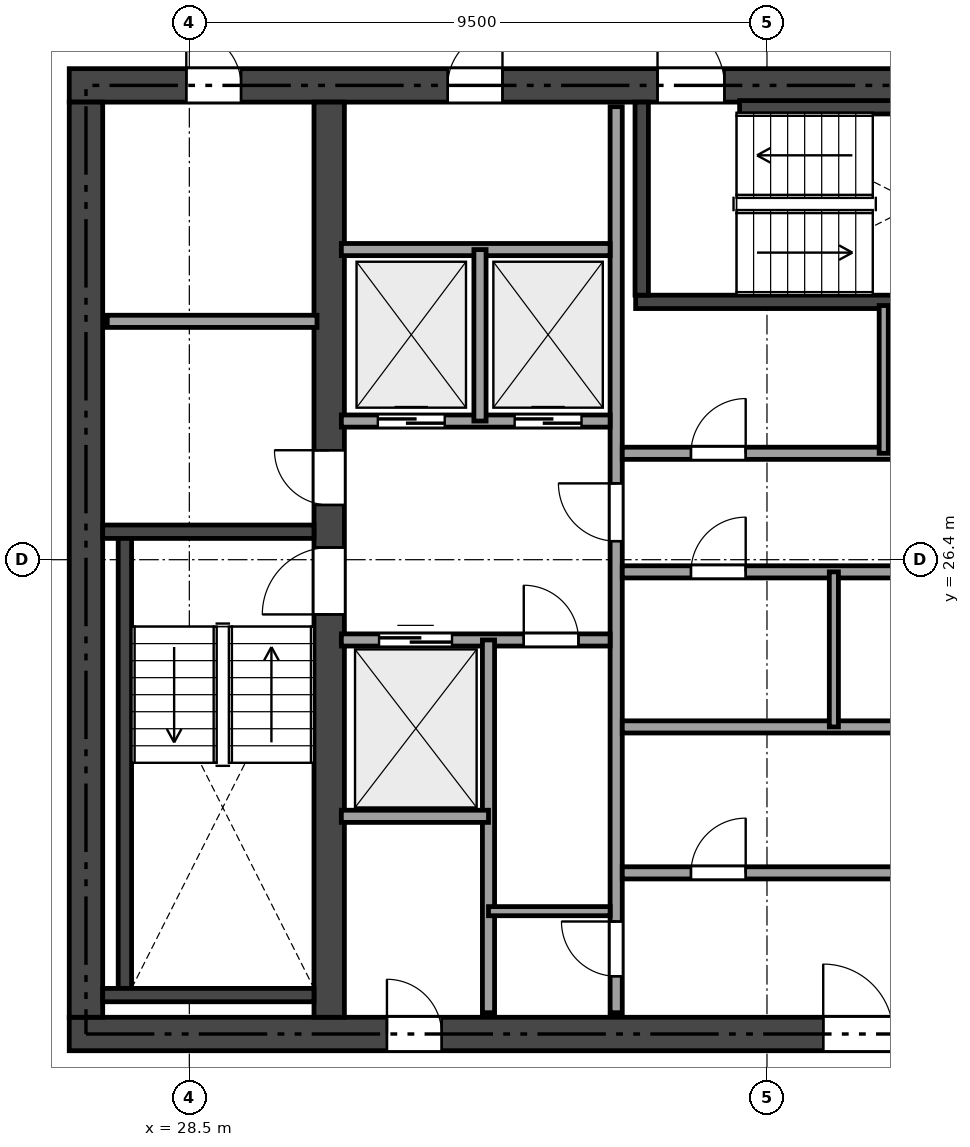
"""IFC4 building model, lengths in metres.
Left out: names, types, materials, properties, quantities, classifications, styles, units other than length and angle.
Written with IfcOpenShell. Run it as: python <this file> out.ifc"""

import sys

from ifc_helpers import new_model, si_unit, direction, frame, frame_2d, origin, place, context, subcontext, project, spatial, rectangle, extrude, element, fill, save


model = new_model("IFC4")
c1 = context("Model", 3, precision=1e-05, world=origin(), true_north=direction((0.0, 1.0)))
c2 = subcontext(c1, "Body", "Model", "MODEL_VIEW")
j1 = project(units=[si_unit("LENGTHUNIT", "METRE"), si_unit("PLANEANGLEUNIT", "RADIAN")], contexts=[c1])
p1 = place(None, origin())
s1 = spatial("IfcSite", under=j1, at=p1, CompositionType="ELEMENT")
p2 = place(p1, origin())
s2 = spatial("IfcBuilding", under=s1, at=p2, CompositionType="ELEMENT")
p3 = place(p2, frame((0.0, 0.0, 286.7)))
s3 = spatial("IfcBuildingStorey", under=s2, at=p3, CompositionType="ELEMENT", Elevation=286.7)
p4 = place(p3, frame((26.525, 18.6, 0.0), z_axis=(0.0, 0.0, 1.0), x_axis=(1.0, 0.0, 0.0)))
e1 = element("IfcWall", 1, at=p4, inside=s3, PredefinedType="SHEAR", context=c2, shape_type="SweptSolid", body=[
    extrude(rectangle(XDim=21.35, YDim=0.55, at=frame_2d((10.675, 0.0))), origin(), (0.0, 0.0, 1.0), 2.78),
])
p5 = place(p4, frame((12.4, 0.0, 0.0)))
e2 = element("IfcOpeningElement", 2, at=p5, cuts=e1, PredefinedType="OPENING", context=c2, shape_type="SweptSolid", body=[
    extrude(rectangle(XDim=1.15, YDim=2.15, at=frame_2d((0.575, 1.075))), frame((0.0, 0.285, 0.0), z_axis=(0.0, -1.0, 0.0), x_axis=(1.0, 0.0, 0.0)), (0.0, 0.0, 1.0), 0.57),
])
p6 = place(p4, frame((5.225, 0.0, 0.0)))
e3 = element("IfcOpeningElement", 3, at=p6, cuts=e1, PredefinedType="OPENING", context=c2, shape_type="SweptSolid", body=[
    extrude(rectangle(XDim=0.9, YDim=2.1, at=frame_2d((0.45, 1.05))), frame((0.0, 0.285, 0.0), z_axis=(0.0, -1.0, 0.0), x_axis=(1.0, 0.0, 0.0)), (0.0, 0.0, 1.0), 0.57),
])
p7 = place(p3, frame((26.525, 34.2, 0.0), z_axis=(0.0, 0.0, 1.0), x_axis=(1.0, 0.0, 0.0)))
e4 = element("IfcWall", 4, at=p7, inside=s3, PredefinedType="SHEAR", context=c2, shape_type="SweptSolid", body=[
    extrude(rectangle(XDim=21.35, YDim=0.55, at=frame_2d((10.675, 0.0))), origin(), (0.0, 0.0, 1.0), 2.78),
])
p8 = place(p7, frame((9.675, 0.0, 0.0)))
e5 = element("IfcOpeningElement", 5, at=p8, cuts=e4, PredefinedType="OPENING", context=c2, shape_type="SweptSolid", body=[
    extrude(rectangle(XDim=1.1, YDim=2.15, at=frame_2d((0.55, 1.075))), frame((0.0, 0.285, 0.0), z_axis=(0.0, -1.0, 0.0), x_axis=(1.0, 0.0, 0.0)), (0.0, 0.0, 1.0), 0.57),
])
p9 = place(p7, frame((1.925, 0.0, 0.0)))
e6 = element("IfcOpeningElement", 6, at=p9, cuts=e4, PredefinedType="OPENING", context=c2, shape_type="SweptSolid", body=[
    extrude(rectangle(XDim=0.9, YDim=2.1, at=frame_2d((0.45, 1.05))), frame((0.0, 0.285, 0.0), z_axis=(0.0, -1.0, 0.0), x_axis=(1.0, 0.0, 0.0)), (0.0, 0.0, 1.0), 0.57),
])
p10 = place(p7, frame((6.225, 0.0, 0.0)))
e7 = element("IfcOpeningElement", 7, at=p10, cuts=e4, PredefinedType="OPENING", context=c2, shape_type="SweptSolid", body=[
    extrude(rectangle(XDim=0.9, YDim=2.1, at=frame_2d((0.45, 1.05))), frame((0.0, 0.285, 0.0), z_axis=(0.0, -1.0, 0.0), x_axis=(1.0, 0.0, 0.0)), (0.0, 0.0, 1.0), 0.57),
])
p11 = place(p3, frame((26.8, 18.875, 0.0), z_axis=(0.0, 0.0, 1.0), x_axis=(0.0, 1.0, 0.0)))
e8 = element("IfcWall", 8, at=p11, inside=s3, PredefinedType="SHEAR", context=c2, shape_type="SweptSolid", body=[
    extrude(rectangle(XDim=15.05, YDim=0.55, at=frame_2d((7.525, 0.0))), origin(), (0.0, 0.0, 1.0), 2.78),
])
p12 = place(p3, frame((30.8, 18.875, 0.0), z_axis=(0.0, 0.0, 1.0), x_axis=(0.0, 1.0, 0.0)))
e9 = element("IfcWall", 9, at=p12, inside=s3, PredefinedType="SHEAR", context=c2, shape_type="SweptSolid", body=[
    extrude(rectangle(XDim=15.05, YDim=0.5, at=frame_2d((7.525, 0.0))), origin(), (0.0, 0.0, 1.0), 2.78),
])
p13 = place(p12, frame((6.625, 0.0, 0.0)))
e10 = element("IfcOpeningElement", 10, at=p13, cuts=e9, PredefinedType="OPENING", context=c2, shape_type="SweptSolid", body=[
    extrude(rectangle(XDim=1.1, YDim=2.15, at=frame_2d((0.55, 1.075))), frame((0.0, 0.26, 0.0), z_axis=(0.0, -1.0, 0.0), x_axis=(1.0, 0.0, 0.0)), (0.0, 0.0, 1.0), 0.52),
])
p14 = place(p12, frame((8.425, 0.0, 0.0)))
e11 = element("IfcOpeningElement", 11, at=p14, cuts=e9, PredefinedType="OPENING", context=c2, shape_type="SweptSolid", body=[
    extrude(rectangle(XDim=0.9, YDim=2.1, at=frame_2d((0.45, 1.05))), frame((0.0, 0.26, 0.0), z_axis=(0.0, -1.0, 0.0), x_axis=(1.0, 0.0, 0.0)), (0.0, 0.0, 1.0), 0.52),
])
p15 = place(p3, frame((27.075, 26.86, 0.0), z_axis=(0.0, 0.0, 1.0), x_axis=(1.0, 0.0, 0.0)))
e12 = element("IfcWall", 12, at=p15, inside=s3, PredefinedType="SHEAR", context=c2, shape_type="SweptSolid", body=[
    extrude(rectangle(XDim=3.475, YDim=0.22, at=frame_2d((1.738, 0.0))), origin(), (0.0, 0.0, 1.0), 2.78),
])
p16 = place(p3, frame((27.44, 19.35, 0.0), z_axis=(0.0, 0.0, 1.0), x_axis=(0.0, 1.0, 0.0)))
e13 = element("IfcWall", 13, at=p16, inside=s3, PredefinedType="SHEAR", context=c2, shape_type="SweptSolid", body=[
    extrude(rectangle(XDim=7.4, YDim=0.22, at=frame_2d((3.7, 0.0))), origin(), (0.0, 0.0, 1.0), 2.78),
])
p17 = place(p3, frame((27.075, 19.24, 0.0), z_axis=(0.0, 0.0, 1.0), x_axis=(1.0, 0.0, 0.0)))
e14 = element("IfcWall", 14, at=p17, inside=s3, PredefinedType="SHEAR", context=c2, shape_type="SweptSolid", body=[
    extrude(rectangle(XDim=3.475, YDim=0.22, at=frame_2d((1.738, 0.0))), origin(), (0.0, 0.0, 1.0), 2.78),
])
p18 = place(p3, frame((35.84, 30.64, 0.0), z_axis=(0.0, 0.0, 1.0), x_axis=(1.0, 0.0, 0.0)))
e15 = element("IfcWall", 15, at=p18, inside=s3, PredefinedType="SHEAR", context=c2, shape_type="SweptSolid", body=[
    extrude(rectangle(XDim=7.61, YDim=0.22, at=frame_2d((3.805, 0.0))), origin(), (0.0, 0.0, 1.0), 2.78),
])
p19 = place(p3, frame((35.94, 30.75, 0.0), z_axis=(0.0, 0.0, 1.0), x_axis=(0.0, 1.0, 0.0)))
e16 = element("IfcWall", 16, at=p19, inside=s3, PredefinedType="SHEAR", context=c2, shape_type="SweptSolid", body=[
    extrude(rectangle(XDim=3.175, YDim=0.22, at=frame_2d((1.587, 0.0))), origin(), (0.0, 0.0, 1.0), 2.78),
])
p20 = place(p3, frame((37.55, 33.84, 0.0), z_axis=(0.0, 0.0, 1.0), x_axis=(1.0, 0.0, 0.0)))
e17 = element("IfcWall", 17, at=p20, inside=s3, PredefinedType="SHEAR", context=c2, shape_type="SweptSolid", body=[
    extrude(rectangle(XDim=5.9, YDim=0.22, at=frame_2d((2.95, 0.0))), origin(), (0.0, 0.0, 1.0), 2.78),
])
p21 = place(p3, frame((27.15, 30.32, 0.0), z_axis=(0.0, 0.0, 1.0), x_axis=(1.0, 0.0, 0.0)))
e18 = element("IfcWall", 18, at=p21, inside=s3, PredefinedType="SOLIDWALL", context=c2, shape_type="SweptSolid", body=[
    extrude(rectangle(XDim=3.45, YDim=0.2, at=frame_2d((1.725, 0.0))), origin(), (0.0, 0.0, 1.0), 2.78),
])
p22 = place(p3, frame((35.52, 18.95, 0.0), z_axis=(0.0, 0.0, 1.0), x_axis=(0.0, 1.0, 0.0)))
e19 = element("IfcWall", 19, at=p22, inside=s3, PredefinedType="SOLIDWALL", context=c2, shape_type="SweptSolid", body=[
    extrude(rectangle(XDim=14.9, YDim=0.2, at=frame_2d((7.45, 0.0))), origin(), (0.0, 0.0, 1.0), 2.301),
])
p23 = place(p22, frame((7.755, 0.0, 0.0)))
e20 = element("IfcOpeningElement", 20, at=p23, cuts=e19, PredefinedType="OPENING", context=c2, shape_type="SweptSolid", body=[
    extrude(rectangle(XDim=0.95, YDim=2.15, at=frame_2d((0.475, 1.075))), frame((0.0, 0.11, 0.0), z_axis=(0.0, -1.0, 0.0), x_axis=(1.0, 0.0, 0.0)), (0.0, 0.0, 1.0), 0.22),
])
p24 = place(p22, frame((0.6, 0.0, 0.0)))
e21 = element("IfcOpeningElement", 21, at=p24, cuts=e19, PredefinedType="OPENING", context=c2, shape_type="SweptSolid", body=[
    extrude(rectangle(XDim=0.9, YDim=2.1, at=frame_2d((0.45, 1.05))), frame((0.0, 0.11, 0.0), z_axis=(0.0, -1.0, 0.0), x_axis=(1.0, 0.0, 0.0)), (0.0, 0.0, 1.0), 0.22),
])
p25 = place(p3, frame((31.0, 28.68, 0.0), z_axis=(0.0, 0.0, 1.0), x_axis=(1.0, 0.0, 0.0)))
e22 = element("IfcWall", 22, at=p25, inside=s3, PredefinedType="SOLIDWALL", context=c2, shape_type="SweptSolid", body=[
    extrude(rectangle(XDim=4.42, YDim=0.2, at=frame_2d((2.21, 0.0))), origin(), (0.0, 0.0, 1.0), 2.78),
])
p26 = place(p25, frame((0.6, 0.0, 0.0)))
e23 = element("IfcOpeningElement", 23, at=p26, cuts=e22, PredefinedType="OPENING", context=c2, shape_type="SweptSolid", body=[
    extrude(rectangle(XDim=1.1, YDim=2.15, at=frame_2d((0.55, 1.075))), frame((0.0, 0.11, 0.0), z_axis=(0.0, -1.0, 0.0), x_axis=(1.0, 0.0, 0.0)), (0.0, 0.0, 1.0), 0.22),
])
p27 = place(p25, frame((2.85, 0.0, 0.0)))
e24 = element("IfcOpeningElement", 24, at=p27, cuts=e22, PredefinedType="OPENING", context=c2, shape_type="SweptSolid", body=[
    extrude(rectangle(XDim=1.1, YDim=2.15, at=frame_2d((0.55, 1.075))), frame((0.0, 0.11, 0.0), z_axis=(0.0, -1.0, 0.0), x_axis=(1.0, 0.0, 0.0)), (0.0, 0.0, 1.0), 0.22),
])
p28 = place(p3, frame((31.0, 31.5, 0.0), z_axis=(0.0, 0.0, 1.0), x_axis=(1.0, 0.0, 0.0)))
e25 = element("IfcWall", 25, at=p28, inside=s3, PredefinedType="SOLIDWALL", context=c2, shape_type="SweptSolid", body=[
    extrude(rectangle(XDim=4.42, YDim=0.2, at=frame_2d((2.21, 0.0))), origin(), (0.0, 0.0, 1.0), 2.78),
])
p29 = place(p3, frame((33.28, 28.68, 0.0), z_axis=(0.0, 0.0, 1.0), x_axis=(0.0, 1.0, 0.0)))
e26 = element("IfcWall", 26, at=p29, inside=s3, PredefinedType="SOLIDWALL", context=c2, shape_type="SweptSolid", body=[
    extrude(rectangle(XDim=2.82, YDim=0.2, at=frame_2d((1.41, 0.0))), origin(), (0.0, 0.0, 1.0), 2.78),
])
p30 = place(p3, frame((31.0, 25.08, 0.0), z_axis=(0.0, 0.0, 1.0), x_axis=(1.0, 0.0, 0.0)))
e27 = element("IfcWall", 27, at=p30, inside=s3, PredefinedType="SOLIDWALL", context=c2, shape_type="SweptSolid", body=[
    extrude(rectangle(XDim=4.42, YDim=0.2, at=frame_2d((2.21, 0.0))), origin(), (0.0, 0.0, 1.0), 2.78),
])
p31 = place(p30, frame((3.0, 0.0, 0.0)))
e28 = element("IfcOpeningElement", 28, at=p31, cuts=e27, PredefinedType="OPENING", context=c2, shape_type="SweptSolid", body=[
    extrude(rectangle(XDim=0.9, YDim=2.1, at=frame_2d((0.45, 1.05))), frame((0.0, 0.11, 0.0), z_axis=(0.0, -1.0, 0.0), x_axis=(1.0, 0.0, 0.0)), (0.0, 0.0, 1.0), 0.22),
])
p32 = place(p30, frame((0.62, 0.0, 0.0)))
e29 = element("IfcOpeningElement", 29, at=p32, cuts=e27, PredefinedType="OPENING", context=c2, shape_type="SweptSolid", body=[
    extrude(rectangle(XDim=1.2, YDim=2.15, at=frame_2d((0.6, 1.075))), frame((0.0, 0.11, 0.0), z_axis=(0.0, -1.0, 0.0), x_axis=(1.0, 0.0, 0.0)), (0.0, 0.0, 1.0), 0.22),
])
p33 = place(p3, frame((33.42, 18.95, 0.0), z_axis=(0.0, 0.0, 1.0), x_axis=(0.0, 1.0, 0.0)))
e30 = element("IfcWall", 30, at=p33, inside=s3, PredefinedType="SOLIDWALL", context=c2, shape_type="SweptSolid", body=[
    extrude(rectangle(XDim=6.13, YDim=0.2, at=frame_2d((3.065, 0.0))), origin(), (0.0, 0.0, 1.0), 2.301),
])
p34 = place(p3, frame((31.0, 22.18, 0.0), z_axis=(0.0, 0.0, 1.0), x_axis=(1.0, 0.0, 0.0)))
e31 = element("IfcWall", 31, at=p34, inside=s3, PredefinedType="SOLIDWALL", context=c2, shape_type="SweptSolid", body=[
    extrude(rectangle(XDim=2.42, YDim=0.2, at=frame_2d((1.21, 0.0))), origin(), (0.0, 0.0, 1.0), 2.78),
])
p35 = place(p3, frame((33.42, 20.62, 0.0), z_axis=(0.0, 0.0, 1.0), x_axis=(1.0, 0.0, 0.0)))
e32 = element("IfcWall", 32, at=p35, inside=s3, PredefinedType="PARTITIONING", context=c2, shape_type="SweptSolid", body=[
    extrude(rectangle(XDim=2.0, YDim=0.15, at=frame_2d((1.0, 0.0))), origin(), (0.0, 0.0, 1.0), 2.78),
])
p36 = place(p3, frame((35.62, 28.15, 0.0), z_axis=(0.0, 0.0, 1.0), x_axis=(1.0, 0.0, 0.0)))
e33 = element("IfcWall", 33, at=p36, inside=s3, PredefinedType="SOLIDWALL", context=c2, shape_type="SweptSolid", body=[
    extrude(rectangle(XDim=7.88, YDim=0.2, at=frame_2d((3.94, 0.0))), origin(), (0.0, 0.0, 1.0), 2.78),
])
p37 = place(p36, frame((1.13, 0.0, 0.0)))
e34 = element("IfcOpeningElement", 34, at=p37, cuts=e33, PredefinedType="OPENING", context=c2, shape_type="SweptSolid", body=[
    extrude(rectangle(XDim=0.9, YDim=2.1, at=frame_2d((0.45, 1.05))), frame((0.0, 0.11, 0.0), z_axis=(0.0, -1.0, 0.0), x_axis=(1.0, 0.0, 0.0)), (0.0, 0.0, 1.0), 0.22),
])
p38 = place(p36, frame((5.73, 0.0, 0.0)))
e35 = element("IfcOpeningElement", 35, at=p38, cuts=e33, PredefinedType="OPENING", context=c2, shape_type="SweptSolid", body=[
    extrude(rectangle(XDim=0.9, YDim=2.1, at=frame_2d((0.45, 1.05))), frame((0.0, 0.11, 0.0), z_axis=(0.0, -1.0, 0.0), x_axis=(1.0, 0.0, 0.0)), (0.0, 0.0, 1.0), 0.22),
])
p39 = place(p3, frame((35.62, 26.2, 0.0), z_axis=(0.0, 0.0, 1.0), x_axis=(1.0, 0.0, 0.0)))
e36 = element("IfcWall", 36, at=p39, inside=s3, PredefinedType="SOLIDWALL", context=c2, shape_type="SweptSolid", body=[
    extrude(rectangle(XDim=7.88, YDim=0.2, at=frame_2d((3.94, 0.0))), origin(), (0.0, 0.0, 1.0), 2.78),
])
p40 = place(p39, frame((1.13, 0.0, 0.0)))
e37 = element("IfcOpeningElement", 37, at=p40, cuts=e36, PredefinedType="OPENING", context=c2, shape_type="SweptSolid", body=[
    extrude(rectangle(XDim=0.9, YDim=2.1, at=frame_2d((0.45, 1.05))), frame((0.0, 0.11, 0.0), z_axis=(0.0, -1.0, 0.0), x_axis=(1.0, 0.0, 0.0)), (0.0, 0.0, 1.0), 0.22),
])
p41 = place(p39, frame((5.73, 0.0, 0.0)))
e38 = element("IfcOpeningElement", 38, at=p41, cuts=e36, PredefinedType="OPENING", context=c2, shape_type="SweptSolid", body=[
    extrude(rectangle(XDim=0.9, YDim=2.1, at=frame_2d((0.45, 1.05))), frame((0.0, 0.11, 0.0), z_axis=(0.0, -1.0, 0.0), x_axis=(1.0, 0.0, 0.0)), (0.0, 0.0, 1.0), 0.22),
])
p42 = place(p3, frame((35.62, 23.65, 0.0), z_axis=(0.0, 0.0, 1.0), x_axis=(1.0, 0.0, 0.0)))
e39 = element("IfcWall", 39, at=p42, inside=s3, PredefinedType="SOLIDWALL", context=c2, shape_type="SweptSolid", body=[
    extrude(rectangle(XDim=7.88, YDim=0.2, at=frame_2d((3.94, 0.0))), origin(), (0.0, 0.0, 1.0), 2.301),
])
p43 = place(p3, frame((35.62, 21.25, 0.0), z_axis=(0.0, 0.0, 1.0), x_axis=(1.0, 0.0, 0.0)))
e40 = element("IfcWall", 40, at=p43, inside=s3, PredefinedType="SOLIDWALL", context=c2, shape_type="SweptSolid", body=[
    extrude(rectangle(XDim=7.88, YDim=0.2, at=frame_2d((3.94, 0.0))), origin(), (0.0, 0.0, 1.0), 2.78),
])
p44 = place(p43, frame((1.13, 0.0, 0.0)))
e41 = element("IfcOpeningElement", 41, at=p44, cuts=e40, PredefinedType="OPENING", context=c2, shape_type="SweptSolid", body=[
    extrude(rectangle(XDim=0.9, YDim=2.1, at=frame_2d((0.45, 1.05))), frame((0.0, 0.11, 0.0), z_axis=(0.0, -1.0, 0.0), x_axis=(1.0, 0.0, 0.0)), (0.0, 0.0, 1.0), 0.22),
])
p45 = place(p43, frame((5.73, 0.0, 0.0)))
e42 = element("IfcOpeningElement", 42, at=p45, cuts=e40, PredefinedType="OPENING", context=c2, shape_type="SweptSolid", body=[
    extrude(rectangle(XDim=0.9, YDim=2.1, at=frame_2d((0.45, 1.05))), frame((0.0, 0.11, 0.0), z_axis=(0.0, -1.0, 0.0), x_axis=(1.0, 0.0, 0.0)), (0.0, 0.0, 1.0), 0.22),
])
p46 = place(p3, frame((39.92, 28.15, 0.0), z_axis=(0.0, 0.0, 1.0), x_axis=(0.0, 1.0, 0.0)))
e43 = element("IfcWall", 43, at=p46, inside=s3, PredefinedType="PARTITIONING", context=c2, shape_type="SweptSolid", body=[
    extrude(rectangle(XDim=2.43, YDim=0.15, at=frame_2d((1.215, 0.0))), origin(), (0.0, 0.0, 1.0), 2.78),
])
p47 = place(p3, frame((39.1, 23.65, 0.0), z_axis=(0.0, 0.0, 1.0), x_axis=(0.0, 1.0, 0.0)))
e44 = element("IfcWall", 44, at=p47, inside=s3, PredefinedType="PARTITIONING", context=c2, shape_type="SweptSolid", body=[
    extrude(rectangle(XDim=2.55, YDim=0.15, at=frame_2d((1.275, 0.0))), origin(), (0.0, 0.0, 1.0), 2.301),
])
p48 = place(p13, origin())
e45 = element("IfcDoor", 45, at=p48, inside=s3, OperationType="SINGLE_SWING_LEFT", PredefinedType="DOOR", context=c2, shape_type="SweptSolid", body=[
    extrude(rectangle(XDim=1.1, YDim=2.15, at=frame_2d((0.55, 1.075))), frame((0.0, 0.025, 0.0), z_axis=(0.0, -1.0, 0.0), x_axis=(1.0, 0.0, 0.0)), (0.0, 0.0, 1.0), 0.05),
])
fill(e10, e45)
p49 = place(p8, origin())
e46 = element("IfcDoor", 46, at=p49, inside=s3, OperationType="SINGLE_SWING_LEFT", PredefinedType="DOOR", context=c2, shape_type="SweptSolid", body=[
    extrude(rectangle(XDim=1.1, YDim=2.15, at=frame_2d((0.55, 1.075))), frame((0.0, 0.025, 0.0), z_axis=(0.0, -1.0, 0.0), x_axis=(1.0, 0.0, 0.0)), (0.0, 0.0, 1.0), 0.05),
])
fill(e5, e46)
p50 = place(p23, origin())
e47 = element("IfcDoor", 47, at=p50, inside=s3, OperationType="SINGLE_SWING_RIGHT", PredefinedType="DOOR", context=c2, shape_type="SweptSolid", body=[
    extrude(rectangle(XDim=0.95, YDim=2.15, at=frame_2d((0.475, 1.075))), frame((0.0, 0.025, 0.0), z_axis=(0.0, -1.0, 0.0), x_axis=(1.0, 0.0, 0.0)), (0.0, 0.0, 1.0), 0.05),
])
fill(e20, e47)
p51 = place(p5, origin())
e48 = element("IfcDoor", 48, at=p51, inside=s3, OperationType="SINGLE_SWING_LEFT", PredefinedType="DOOR", context=c2, shape_type="SweptSolid", body=[
    extrude(rectangle(XDim=1.15, YDim=2.15, at=frame_2d((0.575, 1.075))), frame((0.0, 0.025, 0.0), z_axis=(0.0, -1.0, 0.0), x_axis=(1.0, 0.0, 0.0)), (0.0, 0.0, 1.0), 0.05),
])
fill(e2, e48)
p52 = place(p14, origin())
e49 = element("IfcDoor", 49, at=p52, inside=s3, OperationType="SINGLE_SWING_RIGHT", PredefinedType="DOOR", context=c2, shape_type="SweptSolid", body=[
    extrude(rectangle(XDim=0.9, YDim=2.1, at=frame_2d((0.45, 1.05))), frame((0.0, 0.025, 0.0), z_axis=(0.0, -1.0, 0.0), x_axis=(1.0, 0.0, 0.0)), (0.0, 0.0, 1.0), 0.05),
])
fill(e11, e49)
p53 = place(p9, origin())
e50 = element("IfcDoor", 50, at=p53, inside=s3, OperationType="SINGLE_SWING_LEFT", PredefinedType="DOOR", context=c2, shape_type="SweptSolid", body=[
    extrude(rectangle(XDim=0.9, YDim=2.1, at=frame_2d((0.45, 1.05))), frame((0.0, 0.025, 0.0), z_axis=(0.0, -1.0, 0.0), x_axis=(1.0, 0.0, 0.0)), (0.0, 0.0, 1.0), 0.05),
])
fill(e6, e50)
p54 = place(p10, origin())
e51 = element("IfcDoor", 51, at=p54, inside=s3, OperationType="SINGLE_SWING_RIGHT", PredefinedType="DOOR", context=c2, shape_type="SweptSolid", body=[
    extrude(rectangle(XDim=0.9, YDim=2.1, at=frame_2d((0.45, 1.05))), frame((0.0, 0.025, 0.0), z_axis=(0.0, -1.0, 0.0), x_axis=(1.0, 0.0, 0.0)), (0.0, 0.0, 1.0), 0.05),
])
fill(e7, e51)
p55 = place(p6, origin())
e52 = element("IfcDoor", 52, at=p55, inside=s3, OperationType="SINGLE_SWING_LEFT", PredefinedType="DOOR", context=c2, shape_type="SweptSolid", body=[
    extrude(rectangle(XDim=0.9, YDim=2.1, at=frame_2d((0.45, 1.05))), frame((0.0, 0.025, 0.0), z_axis=(0.0, -1.0, 0.0), x_axis=(1.0, 0.0, 0.0)), (0.0, 0.0, 1.0), 0.05),
])
fill(e3, e52)
p56 = place(p24, origin())
e53 = element("IfcDoor", 53, at=p56, inside=s3, OperationType="SINGLE_SWING_RIGHT", PredefinedType="DOOR", context=c2, shape_type="SweptSolid", body=[
    extrude(rectangle(XDim=0.9, YDim=2.1, at=frame_2d((0.45, 1.05))), frame((0.0, 0.025, 0.0), z_axis=(0.0, -1.0, 0.0), x_axis=(1.0, 0.0, 0.0)), (0.0, 0.0, 1.0), 0.05),
])
fill(e21, e53)
p57 = place(p31, origin())
e54 = element("IfcDoor", 54, at=p57, inside=s3, OperationType="SINGLE_SWING_LEFT", PredefinedType="DOOR", context=c2, shape_type="SweptSolid", body=[
    extrude(rectangle(XDim=0.9, YDim=2.1, at=frame_2d((0.45, 1.05))), frame((0.0, 0.025, 0.0), z_axis=(0.0, -1.0, 0.0), x_axis=(1.0, 0.0, 0.0)), (0.0, 0.0, 1.0), 0.05),
])
fill(e28, e54)
p58 = place(p44, origin())
e55 = element("IfcDoor", 55, at=p58, inside=s3, OperationType="SINGLE_SWING_RIGHT", PredefinedType="DOOR", context=c2, shape_type="SweptSolid", body=[
    extrude(rectangle(XDim=0.9, YDim=2.1, at=frame_2d((0.45, 1.05))), frame((0.0, 0.025, 0.0), z_axis=(0.0, -1.0, 0.0), x_axis=(1.0, 0.0, 0.0)), (0.0, 0.0, 1.0), 0.05),
])
fill(e41, e55)
p59 = place(p40, origin())
e56 = element("IfcDoor", 56, at=p59, inside=s3, OperationType="SINGLE_SWING_RIGHT", PredefinedType="DOOR", context=c2, shape_type="SweptSolid", body=[
    extrude(rectangle(XDim=0.9, YDim=2.1, at=frame_2d((0.45, 1.05))), frame((0.0, 0.025, 0.0), z_axis=(0.0, -1.0, 0.0), x_axis=(1.0, 0.0, 0.0)), (0.0, 0.0, 1.0), 0.05),
])
fill(e37, e56)
p60 = place(p37, origin())
e57 = element("IfcDoor", 57, at=p60, inside=s3, OperationType="SINGLE_SWING_RIGHT", PredefinedType="DOOR", context=c2, shape_type="SweptSolid", body=[
    extrude(rectangle(XDim=0.9, YDim=2.1, at=frame_2d((0.45, 1.05))), frame((0.0, 0.025, 0.0), z_axis=(0.0, -1.0, 0.0), x_axis=(1.0, 0.0, 0.0)), (0.0, 0.0, 1.0), 0.05),
])
fill(e34, e57)
p61 = place(p26, origin())
e58 = element("IfcDoor", 58, at=p61, inside=s3, OperationType="SLIDING_TO_LEFT", PredefinedType="DOOR", context=c2, shape_type="SweptSolid", body=[
    extrude(rectangle(XDim=1.1, YDim=2.15, at=frame_2d((0.55, 1.075))), frame((0.0, 0.025, 0.0), z_axis=(0.0, -1.0, 0.0), x_axis=(1.0, 0.0, 0.0)), (0.0, 0.0, 1.0), 0.05),
])
fill(e23, e58)
p62 = place(p27, origin())
e59 = element("IfcDoor", 59, at=p62, inside=s3, OperationType="SLIDING_TO_LEFT", PredefinedType="DOOR", context=c2, shape_type="SweptSolid", body=[
    extrude(rectangle(XDim=1.1, YDim=2.15, at=frame_2d((0.55, 1.075))), frame((0.0, 0.025, 0.0), z_axis=(0.0, -1.0, 0.0), x_axis=(1.0, 0.0, 0.0)), (0.0, 0.0, 1.0), 0.05),
])
fill(e24, e59)
p63 = place(p32, origin())
e60 = element("IfcDoor", 60, at=p63, inside=s3, OperationType="SLIDING_TO_LEFT", PredefinedType="DOOR", context=c2, shape_type="SweptSolid", body=[
    extrude(rectangle(XDim=1.2, YDim=2.15, at=frame_2d((0.6, 1.075))), frame((0.0, 0.025, 0.0), z_axis=(0.0, -1.0, 0.0), x_axis=(1.0, 0.0, 0.0)), (0.0, 0.0, 1.0), 0.05),
])
fill(e29, e60)
save(model, sys.argv[1])
